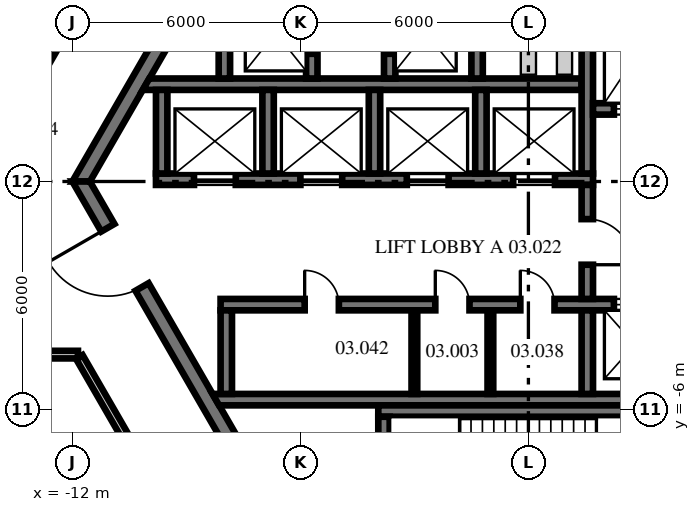
"""IFC4 building model, lengths in metres.
Left out: names, types, materials, properties, quantities, classifications, styles, units other than length and angle.
Written with IfcOpenShell. Run it as: python <this file> out.ifc"""

import sys

from ifc_helpers import new_model, si_unit, direction, frame, frame_2d, origin, place, context, subcontext, project, spatial, polyline, rectangle, outline, extrude, source, transform, mapped, element, fill, save


model = new_model("IFC4")
c1 = context("Model", 3, precision=1e-05, world=origin(), true_north=direction((0.0, 1.0)))
c2 = subcontext(c1, "Body", "Model", "MODEL_VIEW")
j1 = project(units=[si_unit("LENGTHUNIT", "METRE"), si_unit("PLANEANGLEUNIT", "RADIAN")], contexts=[c1])
p1 = place(None, origin())
s1 = spatial("IfcSite", under=j1, at=p1, CompositionType="ELEMENT")
p2 = place(p1, origin())
s2 = spatial("IfcBuilding", under=s1, at=p2, CompositionType="ELEMENT")
p3 = place(p2, frame((0.0, 0.0, 16.0)))
s3 = spatial("IfcBuildingStorey", under=s2, at=p3, CompositionType="ELEMENT", Elevation=16.0)
m1 = source(origin(), c2, "Body", "SweptSolid", [
    extrude(outline(polyline([(-0.115, -0.2), (11.885, -0.2), (11.654, 0.2), (0.115, 0.2), (-0.115, -0.2)])), origin(), (0.0, 0.0, 1.0), 4.1),
])
p4 = place(p3, frame((-5.885, 10.192, 0.0), z_axis=(0.0, 0.0, 1.0), x_axis=(-0.499996592174, -0.866027371285, 0.0)))
e1 = element("IfcWall", 1, at=p4, inside=s3, PredefinedType="SHEAR", context=c2, shape_type="MappedRepresentation", body=[
    mapped(m1, transform((0.0, 0.0, 0.0), scale=1.0)),
])
p5 = place(p4, frame((3.185, 0.0, 0.0)))
e2 = element("IfcOpeningElement", 2, at=p5, cuts=e1, PredefinedType="OPENING", context=c2, shape_type="SweptSolid", body=[
    extrude(rectangle(XDim=1.2, YDim=2.1, at=frame_2d((0.6, 1.05))), frame((0.0, 0.21, 0.0), z_axis=(0.0, -1.0, 0.0), x_axis=(1.0, 0.0, 0.0)), (0.0, 0.0, 1.0), 0.42),
])
p6 = place(p3, frame((-11.769, 0.0, 0.0), z_axis=(0.0, 0.0, 1.0), x_axis=(0.499996592174, -0.866027371285, 0.0)))
e3 = element("IfcWall", 3, at=p6, inside=s3, PredefinedType="SHEAR", context=c2, shape_type="MappedRepresentation", body=[
    mapped(m1, transform((0.0, 0.0, 0.0), scale=1.0)),
])
p7 = place(p6, frame((1.405, 0.0, 0.0)))
e4 = element("IfcOpeningElement", 4, at=p7, cuts=e3, PredefinedType="OPENING", context=c2, shape_type="SweptSolid", body=[
    extrude(rectangle(XDim=1.8, YDim=2.1, at=frame_2d((0.9, 1.05))), frame((0.0, 0.21, 0.0), z_axis=(0.0, -1.0, 0.0), x_axis=(1.0, 0.0, 0.0)), (0.0, 0.0, 1.0), 0.42),
])
p8 = place(p6, frame((7.915, 0.0, 0.0)))
e5 = element("IfcOpeningElement", 5, at=p8, cuts=e3, PredefinedType="OPENING", context=c2, shape_type="SweptSolid", body=[
    extrude(rectangle(XDim=1.2, YDim=2.1, at=frame_2d((0.6, 1.05))), frame((0.0, 0.21, 0.0), z_axis=(0.0, -1.0, 0.0), x_axis=(1.0, 0.0, 0.0)), (0.0, 0.0, 1.0), 0.42),
])
m2 = source(origin(), c2, "Body", "SweptSolid", [
    extrude(rectangle(XDim=11.5, YDim=0.3, at=frame_2d((5.75, 0.0))), origin(), (0.0, 0.0, 1.0), 4.1),
])
p9 = place(p3, frame((-9.8, 0.06, 0.0), z_axis=(0.0, 0.0, 1.0), x_axis=(1.0, 0.0, 0.0)))
e6 = element("IfcWall", 6, at=p9, inside=s3, PredefinedType="SHEAR", context=c2, shape_type="MappedRepresentation", body=[
    mapped(m2, transform((0.0, 0.0, 0.0), scale=1.0)),
])
p10 = place(p9, frame((1.0, 0.0, 0.0)))
e7 = element("IfcOpeningElement", 7, at=p10, cuts=e6, PredefinedType="OPENING", context=c2, shape_type="SweptSolid", body=[
    extrude(rectangle(XDim=1.1, YDim=2.1, at=frame_2d((0.55, 1.05))), frame((0.0, 0.16, 0.0), z_axis=(0.0, -1.0, 0.0), x_axis=(1.0, 0.0, 0.0)), (0.0, 0.0, 1.0), 0.32),
])
p11 = place(p9, frame((3.8, 0.0, 0.0)))
e8 = element("IfcOpeningElement", 8, at=p11, cuts=e6, PredefinedType="OPENING", context=c2, shape_type="SweptSolid", body=[
    extrude(rectangle(XDim=1.1, YDim=2.1, at=frame_2d((0.55, 1.05))), frame((0.0, 0.16, 0.0), z_axis=(0.0, -1.0, 0.0), x_axis=(1.0, 0.0, 0.0)), (0.0, 0.0, 1.0), 0.32),
])
p12 = place(p9, frame((6.6, 0.0, 0.0)))
e9 = element("IfcOpeningElement", 9, at=p12, cuts=e6, PredefinedType="OPENING", context=c2, shape_type="SweptSolid", body=[
    extrude(rectangle(XDim=1.1, YDim=2.1, at=frame_2d((0.55, 1.05))), frame((0.0, 0.16, 0.0), z_axis=(0.0, -1.0, 0.0), x_axis=(1.0, 0.0, 0.0)), (0.0, 0.0, 1.0), 0.32),
])
p13 = place(p9, frame((9.4, 0.0, 0.0)))
e10 = element("IfcOpeningElement", 10, at=p13, cuts=e6, PredefinedType="OPENING", context=c2, shape_type="SweptSolid", body=[
    extrude(rectangle(XDim=1.1, YDim=2.1, at=frame_2d((0.55, 1.05))), frame((0.0, 0.16, 0.0), z_axis=(0.0, -1.0, 0.0), x_axis=(1.0, 0.0, 0.0)), (0.0, 0.0, 1.0), 0.32),
])
m3 = source(origin(), c2, "Body", "SweptSolid", [
    extrude(outline(polyline([(11.2, -0.15), (-0.349, -0.15), (-0.176, 0.15), (11.2, 0.15), (11.2, -0.15)])), origin(), (0.0, 0.0, 1.0), 4.1),
])
p14 = place(p3, frame((-9.8, 2.56, 0.0), z_axis=(0.0, 0.0, 1.0), x_axis=(1.0, 0.0, 0.0)))
e11 = element("IfcWall", 11, at=p14, inside=s3, PredefinedType="SHEAR", context=c2, shape_type="MappedRepresentation", body=[
    mapped(m3, transform((0.0, 0.0, 0.0), scale=1.0)),
])
m4 = source(origin(), c2, "Body", "SweptSolid", [
    extrude(rectangle(XDim=4.45, YDim=0.3, at=frame_2d((2.225, 0.0))), origin(), (0.0, 0.0, 1.0), 4.1),
])
p15 = place(p3, frame((1.55, 0.21, 0.0), z_axis=(0.0, 0.0, 1.0), x_axis=(0.0, 1.0, 0.0)))
e12 = element("IfcWall", 12, at=p15, inside=s3, PredefinedType="SHEAR", context=c2, shape_type="MappedRepresentation", body=[
    mapped(m4, transform((0.0, 0.0, 0.0), scale=1.0)),
])
m5 = source(origin(), c2, "Body", "SweptSolid", [
    extrude(rectangle(XDim=3.0, YDim=0.3, at=frame_2d((1.5, 0.0))), origin(), (0.0, 0.0, 1.0), 4.1),
])
p16 = place(p3, frame((1.7, 1.91, 0.0), z_axis=(0.0, 0.0, 1.0), x_axis=(1.0, 0.0, 0.0)))
e13 = element("IfcWall", 13, at=p16, inside=s3, PredefinedType="SHEAR", context=c2, shape_type="MappedRepresentation", body=[
    mapped(m5, transform((0.0, 0.0, 0.0), scale=1.0)),
])
p17 = place(p16, frame((0.55, 0.0, 0.0)))
e14 = element("IfcOpeningElement", 14, at=p17, cuts=e13, PredefinedType="OPENING", context=c2, shape_type="SweptSolid", body=[
    extrude(rectangle(XDim=1.1, YDim=2.1, at=frame_2d((0.55, 1.05))), frame((0.0, 0.16, 0.0), z_axis=(0.0, -1.0, 0.0), x_axis=(1.0, 0.0, 0.0)), (0.0, 0.0, 1.0), 0.32),
])
m6 = source(origin(), c2, "Body", "SweptSolid", [
    extrude(rectangle(XDim=12.8, YDim=0.3, at=frame_2d((6.4, 0.0))), origin(), (0.0, 0.0, 1.0), 4.1),
])
p18 = place(p3, frame((-8.1, -3.24, 0.0), z_axis=(0.0, 0.0, 1.0), x_axis=(1.0, 0.0, 0.0)))
e15 = element("IfcWall", 15, at=p18, inside=s3, PredefinedType="SHEAR", context=c2, shape_type="MappedRepresentation", body=[
    mapped(m6, transform((0.0, 0.0, 0.0), scale=1.0)),
])
p19 = place(p18, frame((2.212, 0.0, 0.0)))
e16 = element("IfcOpeningElement", 16, at=p19, cuts=e15, PredefinedType="OPENING", context=c2, shape_type="SweptSolid", body=[
    extrude(rectangle(XDim=0.9, YDim=2.1, at=frame_2d((0.45, 1.05))), frame((0.0, 0.16, 0.0), z_axis=(0.0, -1.0, 0.0), x_axis=(1.0, 0.0, 0.0)), (0.0, 0.0, 1.0), 0.32),
])
p20 = place(p18, frame((5.65, 0.0, 0.0)))
e17 = element("IfcOpeningElement", 17, at=p20, cuts=e15, PredefinedType="OPENING", context=c2, shape_type="SweptSolid", body=[
    extrude(rectangle(XDim=0.9, YDim=2.1, at=frame_2d((0.45, 1.05))), frame((0.0, 0.16, 0.0), z_axis=(0.0, -1.0, 0.0), x_axis=(1.0, 0.0, 0.0)), (0.0, 0.0, 1.0), 0.32),
])
p21 = place(p18, frame((7.887, 0.0, 0.0)))
e18 = element("IfcOpeningElement", 18, at=p21, cuts=e15, PredefinedType="OPENING", context=c2, shape_type="SweptSolid", body=[
    extrude(rectangle(XDim=0.9, YDim=2.1, at=frame_2d((0.45, 1.05))), frame((0.0, 0.16, 0.0), z_axis=(0.0, -1.0, 0.0), x_axis=(1.0, 0.0, 0.0)), (0.0, 0.0, 1.0), 0.32),
])
p22 = place(p18, frame((10.35, 0.0, 0.0)))
e19 = element("IfcOpeningElement", 19, at=p22, cuts=e15, PredefinedType="OPENING", context=c2, shape_type="SweptSolid", body=[
    extrude(rectangle(XDim=1.1, YDim=2.1, at=frame_2d((0.55, 1.05))), frame((0.0, 0.16, 0.0), z_axis=(0.0, -1.0, 0.0), x_axis=(1.0, 0.0, 0.0)), (0.0, 0.0, 1.0), 0.32),
])
m7 = source(origin(), c2, "Body", "SweptSolid", [
    extrude(outline(polyline([(12.0, -0.15), (-0.04, -0.15), (-0.213, 0.15), (12.0, 0.15), (12.0, -0.15)])), origin(), (0.0, 0.0, 1.0), 4.1),
])
p23 = place(p3, frame((-8.1, -5.74, 0.0), z_axis=(0.0, 0.0, 1.0), x_axis=(1.0, 0.0, 0.0)))
e20 = element("IfcWall", 20, at=p23, inside=s3, PredefinedType="SHEAR", context=c2, shape_type="MappedRepresentation", body=[
    mapped(m7, transform((0.0, 0.0, 0.0), scale=1.0)),
])
m8 = source(origin(), c2, "Body", "SweptSolid", [
    extrude(rectangle(XDim=2.2, YDim=0.3, at=frame_2d((1.1, 0.0))), origin(), (0.0, 0.0, 1.0), 4.1),
])
p24 = place(p3, frame((-7.95, -5.59, 0.0), z_axis=(0.0, 0.0, 1.0), x_axis=(0.0, 1.0, 0.0)))
e21 = element("IfcWall", 21, at=p24, inside=s3, PredefinedType="SHEAR", context=c2, shape_type="MappedRepresentation", body=[
    mapped(m8, transform((0.0, 0.0, 0.0), scale=1.0)),
])
m9 = source(origin(), c2, "Body", "SweptSolid", [
    extrude(rectangle(XDim=2.2, YDim=0.3, at=frame_2d((1.1, 0.0))), origin(), (0.0, 0.0, 1.0), 4.1),
])
p25 = place(p3, frame((-9.65, 0.21, 0.0), z_axis=(0.0, 0.0, 1.0), x_axis=(0.0, 1.0, 0.0)))
e22 = element("IfcWall", 22, at=p25, inside=s3, PredefinedType="SHEAR", context=c2, shape_type="MappedRepresentation", body=[
    mapped(m9, transform((0.0, 0.0, 0.0), scale=1.0)),
])
p26 = place(p3, frame((1.55, -5.59, 0.0), z_axis=(0.0, 0.0, 1.0), x_axis=(0.0, 1.0, 0.0)))
e23 = element("IfcWall", 23, at=p26, inside=s3, PredefinedType="SHEAR", context=c2, shape_type="MappedRepresentation", body=[
    mapped(m8, transform((0.0, 0.0, 0.0), scale=1.0)),
])
p27 = place(p3, frame((1.55, -3.09, 0.0), z_axis=(0.0, 0.0, 1.0), x_axis=(0.0, 1.0, 0.0)))
e24 = element("IfcWall", 24, at=p27, inside=s3, PredefinedType="SHEAR", context=c2, shape_type="MappedRepresentation", body=[
    mapped(m5, transform((0.0, 0.0, 0.0), scale=1.0)),
])
p28 = place(p27, frame((0.9, 0.0, 0.0)))
e25 = element("IfcOpeningElement", 25, at=p28, cuts=e24, PredefinedType="OPENING", context=c2, shape_type="SweptSolid", body=[
    extrude(rectangle(XDim=1.2, YDim=2.1, at=frame_2d((0.6, 1.05))), frame((0.0, 0.16, 0.0), z_axis=(0.0, -1.0, 0.0), x_axis=(1.0, 0.0, 0.0)), (0.0, 0.0, 1.0), 0.32),
])
m10 = source(origin(), c2, "Body", "SweptSolid", [
    extrude(outline(polyline([(0.0, -0.15), (8.95, -0.15), (8.65, 0.15), (0.0, 0.15), (0.0, -0.15)])), origin(), (0.0, 0.0, 1.0), 4.1),
])
p29 = place(p3, frame((-3.95, -6.04, 0.0), z_axis=(0.0, 0.0, 1.0), x_axis=(1.0, 0.0, 0.0)))
e26 = element("IfcWall", 26, at=p29, inside=s3, PredefinedType="SHEAR", context=c2, shape_type="MappedRepresentation", body=[
    mapped(m10, transform((0.0, 0.0, 0.0), scale=1.0)),
])
m11 = source(origin(), c2, "Body", "SweptSolid", [
    extrude(outline(polyline([(3.8, -0.15), (-0.004, -0.15), (-0.004, 0.15), (3.8, 0.15), (3.8, -0.15)])), origin(), (0.0, 0.0, 1.0), 4.1),
])
p30 = place(p3, frame((-3.8, -9.99, 0.0), z_axis=(0.0, 0.0, 1.0), x_axis=(0.0, 1.0, 0.0)))
e27 = element("IfcWall", 27, at=p30, inside=s3, PredefinedType="SHEAR", context=c2, shape_type="MappedRepresentation", body=[
    mapped(m11, transform((0.0, 0.0, 0.0), scale=1.0)),
])
m12 = source(origin(), c2, "Body", "SweptSolid", [
    extrude(rectangle(XDim=2.4, YDim=0.3, at=frame_2d((1.2, 0.0))), origin(), (0.0, 0.0, 1.0), 4.1),
])
p31 = place(p3, frame((-8.0, 2.71, 0.0), z_axis=(0.0, 0.0, 1.0), x_axis=(0.0, 1.0, 0.0)))
e28 = element("IfcWall", 28, at=p31, inside=s3, PredefinedType="SHEAR", context=c2, shape_type="MappedRepresentation", body=[
    mapped(m12, transform((0.0, 0.0, 0.0), scale=1.0)),
])
p32 = place(p3, frame((-5.7, 2.71, 0.0), z_axis=(0.0, 0.0, 1.0), x_axis=(0.0, 1.0, 0.0)))
e29 = element("IfcWall", 29, at=p32, inside=s3, PredefinedType="SHEAR", context=c2, shape_type="MappedRepresentation", body=[
    mapped(m12, transform((0.0, 0.0, 0.0), scale=1.0)),
])
p33 = place(p32, frame((0.65, 0.0, 0.0)))
e30 = element("IfcOpeningElement", 30, at=p33, cuts=e29, PredefinedType="OPENING", context=c2, shape_type="SweptSolid", body=[
    extrude(rectangle(XDim=1.1, YDim=2.1, at=frame_2d((0.55, 1.05))), frame((0.0, 0.16, 0.0), z_axis=(0.0, -1.0, 0.0), x_axis=(1.0, 0.0, 0.0)), (0.0, 0.0, 1.0), 0.32),
])
p34 = place(p3, frame((-3.65, 2.71, 0.0), z_axis=(0.0, 0.0, 1.0), x_axis=(0.0, 1.0, 0.0)))
e31 = element("IfcWall", 31, at=p34, inside=s3, PredefinedType="SHEAR", context=c2, shape_type="MappedRepresentation", body=[
    mapped(m12, transform((0.0, 0.0, 0.0), scale=1.0)),
])
p35 = place(p34, frame((0.65, 0.0, 0.0)))
e32 = element("IfcOpeningElement", 32, at=p35, cuts=e31, PredefinedType="OPENING", context=c2, shape_type="SweptSolid", body=[
    extrude(rectangle(XDim=1.1, YDim=2.1, at=frame_2d((0.55, 1.05))), frame((0.0, 0.16, 0.0), z_axis=(0.0, -1.0, 0.0), x_axis=(1.0, 0.0, 0.0)), (0.0, 0.0, 1.0), 0.32),
])
p36 = place(p3, frame((-1.35, 2.71, 0.0), z_axis=(0.0, 0.0, 1.0), x_axis=(0.0, 1.0, 0.0)))
e33 = element("IfcWall", 33, at=p36, inside=s3, PredefinedType="SHEAR", context=c2, shape_type="MappedRepresentation", body=[
    mapped(m12, transform((0.0, 0.0, 0.0), scale=1.0)),
])
for number, where, z_axis, x_axis in (
    (34, (-6.85, 0.21, 0.0), (0.0, 0.0, 1.0), (0.0, 1.0, 0.0)),
    (35, (-4.05, 0.21, 0.0), (0.0, 0.0, 1.0), (0.0, 1.0, 0.0)),
    (36, (-1.25, 0.21, 0.0), (0.0, 0.0, 1.0), (0.0, 1.0, 0.0)),
):
    element("IfcWall", number, at=place(p3, frame(where, z_axis=z_axis, x_axis=x_axis)), inside=s3, PredefinedType="SHEAR", context=c2, shape_type="MappedRepresentation", body=[
        mapped(m9, transform((0.0, 0.0, 0.0), scale=1.0)),
    ])
m13 = source(origin(), c2, "Body", "SweptSolid", [
    extrude(rectangle(XDim=2.2, YDim=0.15, at=frame_2d((1.1, 0.0))), origin(), (0.0, 0.0, 1.0), 4.1),
])
for number, where, z_axis, x_axis in (
    (37, (-3.0, -5.59, 0.0), (0.0, 0.0, 1.0), (0.0, 1.0, 0.0)),
    (38, (-1.0, -5.59, 0.0), (0.0, 0.0, 1.0), (0.0, 1.0, 0.0)),
):
    element("IfcWall", number, at=place(p3, frame(where, z_axis=z_axis, x_axis=x_axis)), inside=s3, PredefinedType="PARTITIONING", context=c2, shape_type="MappedRepresentation", body=[
        mapped(m13, transform((0.0, 0.0, 0.0), scale=1.0)),
    ])
p37 = place(p3, frame((-11.818, -4.615, 0.0), z_axis=(0.0, 0.0, 1.0), x_axis=(0.500011831956, -0.866018572493, 0.0)))
e39 = element("IfcWall", 39, at=p37, inside=s3, PredefinedType="PARTITIONING", context=c2, shape_type="SweptSolid", body=[
    extrude(rectangle(XDim=9.153, YDim=0.2, at=frame_2d((4.577, 0.0))), origin(), (0.0, 0.0, 1.0), 4.1),
])
p38 = place(p3, frame((-28.569, -4.555, 0.0), z_axis=(0.0, 0.0, 1.0), x_axis=(1.0, 0.0, 0.0)))
e40 = element("IfcWall", 40, at=p38, inside=s3, PredefinedType="PARTITIONING", context=c2, shape_type="SweptSolid", body=[
    extrude(rectangle(XDim=16.716, YDim=0.2, at=frame_2d((8.358, 0.0))), origin(), (0.0, 0.0, 1.0), 4.1),
])
p39 = place(p38, frame((5.779, 0.0, 0.0)))
e41 = element("IfcOpeningElement", 41, at=p39, cuts=e40, PredefinedType="OPENING", context=c2, shape_type="SweptSolid", body=[
    extrude(rectangle(XDim=1.0, YDim=2.1, at=frame_2d((0.5, 1.05))), frame((0.0, 0.11, 0.0), z_axis=(0.0, -1.0, 0.0), x_axis=(1.0, 0.0, 0.0)), (0.0, 0.0, 1.0), 0.22),
])
p40 = place(p3, frame((-14.473, 0.017, 0.0), z_axis=(0.0, 0.0, 1.0), x_axis=(0.500022314862, 0.866012519909, 0.0)))
e42 = element("IfcWall", 42, at=p40, inside=s3, PredefinedType="PARTITIONING", context=c2, shape_type="SweptSolid", body=[
    extrude(rectangle(XDim=4.111, YDim=0.15, at=frame_2d((2.056, 0.0))), origin(), (0.0, 0.0, 1.0), 4.1),
])
p41 = place(p40, frame((1.625, 0.0, 0.0)))
e43 = element("IfcOpeningElement", 43, at=p41, cuts=e42, PredefinedType="OPENING", context=c2, shape_type="SweptSolid", body=[
    extrude(rectangle(XDim=0.9, YDim=2.1, at=frame_2d((0.45, 1.05))), frame((0.0, 0.085, 0.0), z_axis=(0.0, -1.0, 0.0), x_axis=(1.0, 0.0, 0.0)), (0.0, 0.0, 1.0), 0.17),
])
p42 = place(p7, frame((1.8, 0.0, 0.0), z_axis=(0.0, 0.0, 1.0), x_axis=(-1.0, 0.0, 0.0)))
e44 = element("IfcDoor", 44, at=p42, inside=s3, OperationType="DOUBLE_DOOR_DOUBLE_SWING", PredefinedType="DOOR", context=c2, shape_type="SweptSolid", body=[
    extrude(rectangle(XDim=1.8, YDim=2.1, at=frame_2d((0.9, 1.05))), frame((0.0, 0.025, 0.0), z_axis=(0.0, -1.0, 0.0), x_axis=(1.0, 0.0, 0.0)), (0.0, 0.0, 1.0), 0.05),
])
fill(e4, e44)
p43 = place(p28, frame((1.2, 0.0, 0.0), z_axis=(0.0, 0.0, 1.0), x_axis=(-1.0, 0.0, 0.0)))
e45 = element("IfcDoor", 45, at=p43, inside=s3, OperationType="SINGLE_SWING_RIGHT", PredefinedType="DOOR", context=c2, shape_type="SweptSolid", body=[
    extrude(rectangle(XDim=1.2, YDim=2.1, at=frame_2d((0.6, 1.05))), frame((0.0, 0.025, 0.0), z_axis=(0.0, -1.0, 0.0), x_axis=(1.0, 0.0, 0.0)), (0.0, 0.0, 1.0), 0.05),
])
fill(e25, e45)
p44 = place(p19, origin())
e46 = element("IfcDoor", 46, at=p44, inside=s3, OperationType="SINGLE_SWING_LEFT", PredefinedType="DOOR", context=c2, shape_type="SweptSolid", body=[
    extrude(rectangle(XDim=0.9, YDim=2.1, at=frame_2d((0.45, 1.05))), frame((0.0, 0.025, 0.0), z_axis=(0.0, -1.0, 0.0), x_axis=(1.0, 0.0, 0.0)), (0.0, 0.0, 1.0), 0.05),
])
fill(e16, e46)
p45 = place(p20, origin())
e47 = element("IfcDoor", 47, at=p45, inside=s3, OperationType="SINGLE_SWING_LEFT", PredefinedType="DOOR", context=c2, shape_type="SweptSolid", body=[
    extrude(rectangle(XDim=0.9, YDim=2.1, at=frame_2d((0.45, 1.05))), frame((0.0, 0.025, 0.0), z_axis=(0.0, -1.0, 0.0), x_axis=(1.0, 0.0, 0.0)), (0.0, 0.0, 1.0), 0.05),
])
fill(e17, e47)
p46 = place(p21, origin())
e48 = element("IfcDoor", 48, at=p46, inside=s3, OperationType="SINGLE_SWING_LEFT", PredefinedType="DOOR", context=c2, shape_type="SweptSolid", body=[
    extrude(rectangle(XDim=0.9, YDim=2.1, at=frame_2d((0.45, 1.05))), frame((0.0, 0.025, 0.0), z_axis=(0.0, -1.0, 0.0), x_axis=(1.0, 0.0, 0.0)), (0.0, 0.0, 1.0), 0.05),
])
fill(e18, e48)
p47 = place(p10, origin())
e49 = element("IfcDoor", 49, at=p47, inside=s3, OperationType="DOUBLE_DOOR_SLIDING", PredefinedType="DOOR", context=c2, shape_type="SweptSolid", body=[
    extrude(rectangle(XDim=1.1, YDim=2.1, at=frame_2d((0.55, 1.05))), frame((0.0, 0.025, 0.0), z_axis=(0.0, -1.0, 0.0), x_axis=(1.0, 0.0, 0.0)), (0.0, 0.0, 1.0), 0.05),
])
fill(e7, e49)
p48 = place(p11, origin())
e50 = element("IfcDoor", 50, at=p48, inside=s3, OperationType="DOUBLE_DOOR_SLIDING", PredefinedType="DOOR", context=c2, shape_type="SweptSolid", body=[
    extrude(rectangle(XDim=1.1, YDim=2.1, at=frame_2d((0.55, 1.05))), frame((0.0, 0.025, 0.0), z_axis=(0.0, -1.0, 0.0), x_axis=(1.0, 0.0, 0.0)), (0.0, 0.0, 1.0), 0.05),
])
fill(e8, e50)
p49 = place(p12, origin())
e51 = element("IfcDoor", 51, at=p49, inside=s3, OperationType="DOUBLE_DOOR_SLIDING", PredefinedType="DOOR", context=c2, shape_type="SweptSolid", body=[
    extrude(rectangle(XDim=1.1, YDim=2.1, at=frame_2d((0.55, 1.05))), frame((0.0, 0.025, 0.0), z_axis=(0.0, -1.0, 0.0), x_axis=(1.0, 0.0, 0.0)), (0.0, 0.0, 1.0), 0.05),
])
fill(e9, e51)
p50 = place(p13, origin())
e52 = element("IfcDoor", 52, at=p50, inside=s3, OperationType="DOUBLE_DOOR_SLIDING", PredefinedType="DOOR", context=c2, shape_type="SweptSolid", body=[
    extrude(rectangle(XDim=1.1, YDim=2.1, at=frame_2d((0.55, 1.05))), frame((0.0, 0.025, 0.0), z_axis=(0.0, -1.0, 0.0), x_axis=(1.0, 0.0, 0.0)), (0.0, 0.0, 1.0), 0.05),
])
fill(e10, e52)
p51 = place(p17, origin())
e53 = element("IfcDoor", 53, at=p51, inside=s3, OperationType="DOUBLE_DOOR_SLIDING", PredefinedType="DOOR", context=c2, shape_type="SweptSolid", body=[
    extrude(rectangle(XDim=1.1, YDim=2.1, at=frame_2d((0.55, 1.05))), frame((0.0, 0.025, 0.0), z_axis=(0.0, -1.0, 0.0), x_axis=(1.0, 0.0, 0.0)), (0.0, 0.0, 1.0), 0.05),
])
fill(e14, e53)
p52 = place(p22, origin())
e54 = element("IfcDoor", 54, at=p52, inside=s3, OperationType="DOUBLE_DOOR_SLIDING", PredefinedType="DOOR", context=c2, shape_type="SweptSolid", body=[
    extrude(rectangle(XDim=1.1, YDim=2.1, at=frame_2d((0.55, 1.05))), frame((0.0, 0.025, 0.0), z_axis=(0.0, -1.0, 0.0), x_axis=(1.0, 0.0, 0.0)), (0.0, 0.0, 1.0), 0.05),
])
fill(e19, e54)
p53 = place(p33, origin())
e55 = element("IfcDoor", 55, at=p53, inside=s3, OperationType="DOUBLE_DOOR_SLIDING", PredefinedType="DOOR", context=c2, shape_type="SweptSolid", body=[
    extrude(rectangle(XDim=1.1, YDim=2.1, at=frame_2d((0.55, 1.05))), frame((0.0, 0.025, 0.0), z_axis=(0.0, -1.0, 0.0), x_axis=(1.0, 0.0, 0.0)), (0.0, 0.0, 1.0), 0.05),
])
fill(e30, e55)
p54 = place(p35, origin())
e56 = element("IfcDoor", 56, at=p54, inside=s3, OperationType="DOUBLE_DOOR_SLIDING", PredefinedType="DOOR", context=c2, shape_type="SweptSolid", body=[
    extrude(rectangle(XDim=1.1, YDim=2.1, at=frame_2d((0.55, 1.05))), frame((0.0, 0.025, 0.0), z_axis=(0.0, -1.0, 0.0), x_axis=(1.0, 0.0, 0.0)), (0.0, 0.0, 1.0), 0.05),
])
fill(e32, e56)
save(model, sys.argv[1])
